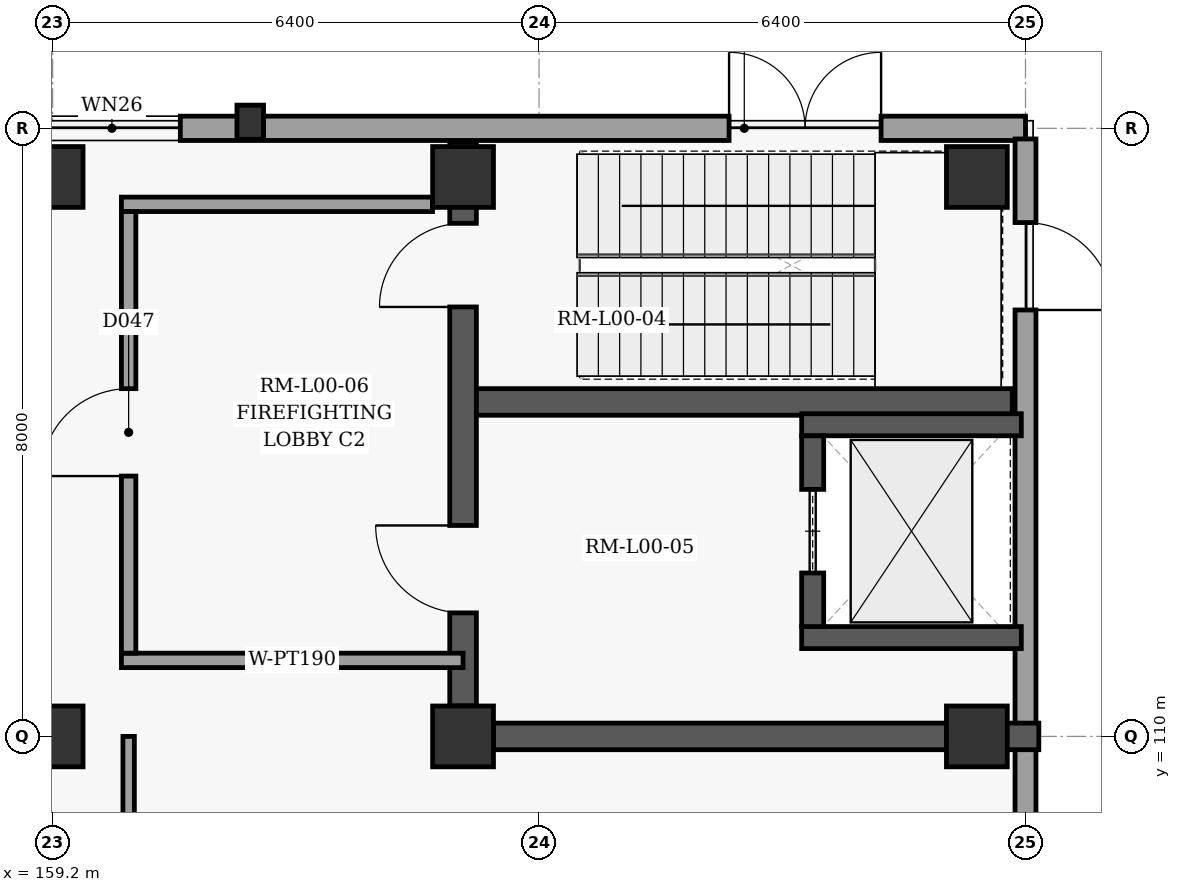
"""IFC4 building model, lengths in metres.
Left out: names, types, materials, properties, quantities, classifications, styles, units other than length and angle.
Written with IfcOpenShell. Run it as: python <this file> out.ifc"""

import sys

from ifc_helpers import new_model, si_unit, direction, frame, frame_2d, origin, origin_2d, place, context, subcontext, project, spatial, rectangle, extrude, element, fill, save


model = new_model("IFC4")
c1 = context("Model", 3, precision=1e-05, world=origin(), true_north=direction((0.0, 1.0)))
c2 = subcontext(c1, "Body", "Model", "MODEL_VIEW")
j1 = project(units=[si_unit("LENGTHUNIT", "METRE"), si_unit("PLANEANGLEUNIT", "RADIAN")], contexts=[c1])
p1 = place(None, origin())
s1 = spatial("IfcSite", under=j1, at=p1, CompositionType="ELEMENT")
p2 = place(p1, origin())
s2 = spatial("IfcBuilding", under=s1, at=p2, CompositionType="ELEMENT")
p3 = place(p2, origin())
s3 = spatial("IfcBuildingStorey", under=s2, at=p3, CompositionType="ELEMENT", Elevation=0.0)
for number, where, z_axis, x_axis in (
    (1, (159.2, 110.0, 0.0), (0.0, 0.0, 1.0), (1.0, 0.0, 0.0)),
    (2, (159.2, 117.36, 0.0), (0.0, 0.0, 1.0), (1.0, 0.0, 0.0)),
    (3, (164.6, 110.0, 0.0), (0.0, 0.0, 1.0), (1.0, 0.0, 0.0)),
    (4, (164.6, 117.36, 0.0), (0.0, 0.0, 1.0), (1.0, 0.0, 0.0)),
    (5, (171.36, 110.0, 0.0), (0.0, 0.0, 1.0), (1.0, 0.0, 0.0)),
    (6, (171.36, 117.36, 0.0), (0.0, 0.0, 1.0), (1.0, 0.0, 0.0)),
):
    element("IfcColumn", number, at=place(p3, frame(where, z_axis=z_axis, x_axis=x_axis)), inside=s3, PredefinedType="COLUMN", context=c2, shape_type="SweptSolid", body=[
        extrude(rectangle(XDim=0.8, YDim=0.8, at=origin_2d()), origin(), (0.0, 0.0, 1.0), 5.4),
    ])
p4 = place(p3, frame((161.8, 118.08, 0.0), z_axis=(0.0, 0.0, 1.0), x_axis=(0.0, 1.0, 0.0)))
e7 = element("IfcColumn", 7, at=p4, inside=s3, PredefinedType="PILASTER", context=c2, shape_type="SweptSolid", body=[
    extrude(rectangle(XDim=0.35, YDim=0.45, at=origin_2d()), origin(), (0.0, 0.0, 1.0), 5.4),
])
p5 = place(p3, frame((139.6, 118.0, 0.0), z_axis=(0.0, 0.0, 1.0), x_axis=(1.0, 0.0, 0.0)))
e8 = element("IfcWall", 8, at=p5, inside=s3, PredefinedType="SOLIDWALL", context=c2, shape_type="SweptSolid", body=[
    extrude(rectangle(XDim=32.4, YDim=0.32, at=frame_2d((16.2, 0.0))), origin(), (0.0, 0.0, 1.0), 5.14),
])
p6 = place(p5, frame((28.5, 0.0, 0.0)))
e9 = element("IfcOpeningElement", 9, at=p6, cuts=e8, PredefinedType="OPENING", context=c2, shape_type="SweptSolid", body=[
    extrude(rectangle(XDim=2.0, YDim=2.5, at=frame_2d((1.0, 1.25))), frame((0.0, 0.17, 0.0), z_axis=(0.0, -1.0, 0.0), x_axis=(1.0, 0.0, 0.0)), (0.0, 0.0, 1.0), 0.34),
])
p7 = place(p5, frame((2.2, 0.0, 0.9)))
e10 = element("IfcOpeningElement", 10, at=p7, cuts=e8, PredefinedType="OPENING", context=c2, shape_type="SweptSolid", body=[
    extrude(rectangle(XDim=3.6, YDim=2.6, at=frame_2d((1.8, 1.3))), frame((0.0, 0.17, 0.0), z_axis=(0.0, -1.0, 0.0), x_axis=(1.0, 0.0, 0.0)), (0.0, 0.0, 1.0), 0.34),
])
p8 = place(p5, frame((7.96, 0.0, 0.9)))
e11 = element("IfcOpeningElement", 11, at=p8, cuts=e8, PredefinedType="OPENING", context=c2, shape_type="SweptSolid", body=[
    extrude(rectangle(XDim=3.8, YDim=2.6, at=frame_2d((1.9, 1.3))), frame((0.0, 0.17, 0.0), z_axis=(0.0, -1.0, 0.0), x_axis=(1.0, 0.0, 0.0)), (0.0, 0.0, 1.0), 0.34),
])
p9 = place(p5, frame((13.72, 0.0, 0.9)))
e12 = element("IfcOpeningElement", 12, at=p9, cuts=e8, PredefinedType="OPENING", context=c2, shape_type="SweptSolid", body=[
    extrude(rectangle(XDim=1.6, YDim=1.65, at=frame_2d((0.8, 0.825))), frame((0.0, 0.17, 0.0), z_axis=(0.0, -1.0, 0.0), x_axis=(1.0, 0.0, 0.0)), (0.0, 0.0, 1.0), 0.34),
])
p10 = place(p5, frame((19.48, 0.0, 0.9)))
e13 = element("IfcOpeningElement", 13, at=p10, cuts=e8, PredefinedType="OPENING", context=c2, shape_type="SweptSolid", body=[
    extrude(rectangle(XDim=1.8, YDim=1.65, at=frame_2d((0.9, 0.825))), frame((0.0, 0.17, 0.0), z_axis=(0.0, -1.0, 0.0), x_axis=(1.0, 0.0, 0.0)), (0.0, 0.0, 1.0), 0.34),
])
p11 = place(p3, frame((172.0, 117.86, 0.0), z_axis=(0.0, 0.0, 1.0), x_axis=(0.0, -1.0, 0.0)))
e14 = element("IfcWall", 14, at=p11, inside=s3, PredefinedType="SOLIDWALL", context=c2, shape_type="SweptSolid", body=[
    extrude(rectangle(XDim=46.12, YDim=0.275, at=frame_2d((23.06, 0.0))), origin(), (0.0, 0.0, 1.0), 5.14),
])
p12 = place(p11, frame((43.87, 0.0, 0.0)))
e15 = element("IfcOpeningElement", 15, at=p12, cuts=e14, PredefinedType="OPENING", context=c2, shape_type="SweptSolid", body=[
    extrude(rectangle(XDim=1.15, YDim=2.2, at=frame_2d((0.575, 1.1))), frame((0.0, 0.147, 0.0), z_axis=(0.0, -1.0, 0.0), x_axis=(1.0, 0.0, 0.0)), (0.0, 0.0, 1.0), 0.295),
])
p13 = place(p11, frame((1.1, 0.0, 0.0)))
e16 = element("IfcOpeningElement", 16, at=p13, cuts=e14, PredefinedType="OPENING", context=c2, shape_type="SweptSolid", body=[
    extrude(rectangle(XDim=1.15, YDim=2.2, at=frame_2d((0.575, 1.1))), frame((0.0, 0.147, 0.0), z_axis=(0.0, -1.0, 0.0), x_axis=(1.0, 0.0, 0.0)), (0.0, 0.0, 1.0), 0.295),
])
p14 = place(p3, frame((165.002, 110.0, 0.0), z_axis=(0.0, 0.0, 1.0), x_axis=(1.0, 0.0, 0.0)))
e17 = element("IfcWall", 17, at=p14, inside=s3, PredefinedType="SHEAR", context=c2, shape_type="SweptSolid", body=[
    extrude(rectangle(XDim=7.173, YDim=0.35, at=frame_2d((3.586, 0.0))), origin(), (0.0, 0.0, 1.0), 5.14),
])
p15 = place(p3, frame((164.6, 110.402, 0.0), z_axis=(0.0, 0.0, 1.0), x_axis=(0.0, 1.0, 0.0)))
e18 = element("IfcWall", 18, at=p15, inside=s3, PredefinedType="SHEAR", context=c2, shape_type="SweptSolid", body=[
    extrude(rectangle(XDim=7.423, YDim=0.35, at=frame_2d((3.711, 0.0))), origin(), (0.0, 0.0, 1.0), 5.14),
])
p16 = place(p15, frame((5.248, 0.0, 0.0)))
e19 = element("IfcOpeningElement", 19, at=p16, cuts=e18, PredefinedType="OPENING", context=c2, shape_type="SweptSolid", body=[
    extrude(rectangle(XDim=1.1, YDim=2.15, at=frame_2d((0.55, 1.075))), frame((0.0, 0.185, 0.0), z_axis=(0.0, -1.0, 0.0), x_axis=(1.0, 0.0, 0.0)), (0.0, 0.0, 1.0), 0.37),
])
p17 = place(p15, frame((1.223, 0.0, 0.0)))
e20 = element("IfcOpeningElement", 20, at=p17, cuts=e18, PredefinedType="OPENING", context=c2, shape_type="SweptSolid", body=[
    extrude(rectangle(XDim=1.15, YDim=2.2, at=frame_2d((0.575, 1.1))), frame((0.0, 0.185, 0.0), z_axis=(0.0, -1.0, 0.0), x_axis=(1.0, 0.0, 0.0)), (0.0, 0.0, 1.0), 0.37),
])
p18 = place(p3, frame((164.775, 114.4, 0.0), z_axis=(0.0, 0.0, 1.0), x_axis=(1.0, 0.0, 0.0)))
e21 = element("IfcWall", 21, at=p18, inside=s3, PredefinedType="SHEAR", context=c2, shape_type="SweptSolid", body=[
    extrude(rectangle(XDim=7.05, YDim=0.35, at=frame_2d((3.525, 0.0))), origin(), (0.0, 0.0, 1.0), 5.14),
])
for number, where, z_axis, x_axis in (
    (22, (169.055, 111.3, 0.0), (0.0, 0.0, 1.0), (1.0, 0.0, 0.0)),
    (23, (169.055, 114.1, 0.0), (0.0, 0.0, 1.0), (1.0, 0.0, 0.0)),
):
    element("IfcWall", number, at=place(p3, frame(where, z_axis=z_axis, x_axis=x_axis)), inside=s3, PredefinedType="SHEAR", context=c2, shape_type="SweptSolid", body=[
        extrude(rectangle(XDim=2.89, YDim=0.29, at=frame_2d((1.445, 0.0))), origin(), (0.0, 0.0, 1.0), 5.14),
    ])
p19 = place(p3, frame((169.2, 111.445, 0.0), z_axis=(0.0, 0.0, 1.0), x_axis=(0.0, 1.0, 0.0)))
e24 = element("IfcWall", 24, at=p19, inside=s3, PredefinedType="SHEAR", context=c2, shape_type="SweptSolid", body=[
    extrude(rectangle(XDim=2.51, YDim=0.29, at=frame_2d((1.255, 0.0))), origin(), (0.0, 0.0, 1.0), 5.14),
])
p20 = place(p19, frame((0.705, 0.0, 0.0)))
e25 = element("IfcOpeningElement", 25, at=p20, cuts=e24, PredefinedType="OPENING", context=c2, shape_type="SweptSolid", body=[
    extrude(rectangle(XDim=1.1, YDim=2.15, at=frame_2d((0.55, 1.075))), frame((0.0, 0.155, 0.0), z_axis=(0.0, -1.0, 0.0), x_axis=(1.0, 0.0, 0.0)), (0.0, 0.0, 1.0), 0.31),
])
p21 = place(p3, frame((160.105, 111.0, 0.0), z_axis=(0.0, 0.0, 1.0), x_axis=(1.0, 0.0, 0.0)))
e26 = element("IfcWall", 26, at=p21, inside=s3, PredefinedType="PARTITIONING", context=c2, shape_type="SweptSolid", body=[
    extrude(rectangle(XDim=4.495, YDim=0.19, at=frame_2d((2.248, 0.0))), origin(), (0.0, 0.0, 1.0), 5.14),
])
p22 = place(p3, frame((160.105, 117.0, 0.0), z_axis=(0.0, 0.0, 1.0), x_axis=(1.0, 0.0, 0.0)))
e27 = element("IfcWall", 27, at=p22, inside=s3, PredefinedType="PARTITIONING", context=c2, shape_type="SweptSolid", body=[
    extrude(rectangle(XDim=4.093, YDim=0.19, at=frame_2d((2.046, 0.0))), origin(), (0.0, 0.0, 1.0), 4.49),
])
p23 = place(p3, frame((160.2, 111.095, 0.0), z_axis=(0.0, 0.0, 1.0), x_axis=(0.0, 1.0, 0.0)))
e28 = element("IfcWall", 28, at=p23, inside=s3, PredefinedType="PARTITIONING", context=c2, shape_type="SweptSolid", body=[
    extrude(rectangle(XDim=5.81, YDim=0.19, at=frame_2d((2.905, 0.0))), origin(), (0.0, 0.0, 1.0), 5.14),
])
p24 = place(p23, frame((2.33, 0.0, 0.0)))
e29 = element("IfcOpeningElement", 29, at=p24, cuts=e28, PredefinedType="OPENING", context=c2, shape_type="SweptSolid", body=[
    extrude(rectangle(XDim=1.15, YDim=2.2, at=frame_2d((0.575, 1.1))), frame((0.0, 0.105, 0.0), z_axis=(0.0, -1.0, 0.0), x_axis=(1.0, 0.0, 0.0)), (0.0, 0.0, 1.0), 0.21),
])
p25 = place(p3, frame((160.2, 110.0, 0.0), z_axis=(0.0, 0.0, 1.0), x_axis=(0.0, -1.0, 0.0)))
e30 = element("IfcWall", 30, at=p25, inside=s3, PredefinedType="PARTITIONING", context=c2, shape_type="SweptSolid", body=[
    extrude(rectangle(XDim=8.0, YDim=0.15, at=frame_2d((4.0, 0.0))), origin(), (0.0, 0.0, 1.0), 5.14),
])
p26 = place(p13, origin())
e31 = element("IfcDoor", 31, at=p26, inside=s3, OperationType="SINGLE_SWING_RIGHT", PredefinedType="DOOR", context=c2, shape_type="SweptSolid", body=[
    extrude(rectangle(XDim=1.15, YDim=2.2, at=frame_2d((0.575, 1.1))), frame((0.0, 0.025, 0.0), z_axis=(0.0, -1.0, 0.0), x_axis=(1.0, 0.0, 0.0)), (0.0, 0.0, 1.0), 0.05),
])
fill(e16, e31)
p27 = place(p6, origin())
e32 = element("IfcDoor", 32, at=p27, inside=s3, OperationType="DOUBLE_SWING_LEFT", PredefinedType="DOOR", context=c2, shape_type="SweptSolid", body=[
    extrude(rectangle(XDim=2.0, YDim=2.5, at=frame_2d((1.0, 1.25))), frame((0.0, 0.025, 0.0), z_axis=(0.0, -1.0, 0.0), x_axis=(1.0, 0.0, 0.0)), (0.0, 0.0, 1.0), 0.05),
])
fill(e9, e32)
p28 = place(p10, origin())
e33 = element("IfcWindow", 33, at=p28, inside=s3, PartitioningType="SINGLE_PANEL", PredefinedType="WINDOW", context=c2, shape_type="SweptSolid", body=[
    extrude(rectangle(XDim=1.8, YDim=1.65, at=frame_2d((0.9, 0.825))), frame((0.0, 0.03, 0.0), z_axis=(0.0, -1.0, 0.0), x_axis=(1.0, 0.0, 0.0)), (0.0, 0.0, 1.0), 0.06),
])
fill(e13, e33)
p29 = place(p16, origin())
e34 = element("IfcDoor", 34, at=p29, inside=s3, OperationType="SINGLE_SWING_LEFT", PredefinedType="DOOR", context=c2, shape_type="SweptSolid", body=[
    extrude(rectangle(XDim=1.1, YDim=2.15, at=frame_2d((0.55, 1.075))), frame((0.0, 0.025, 0.0), z_axis=(0.0, -1.0, 0.0), x_axis=(1.0, 0.0, 0.0)), (0.0, 0.0, 1.0), 0.05),
])
fill(e19, e34)
p30 = place(p17, origin())
e35 = element("IfcDoor", 35, at=p30, inside=s3, OperationType="SINGLE_SWING_RIGHT", PredefinedType="DOOR", context=c2, shape_type="SweptSolid", body=[
    extrude(rectangle(XDim=1.15, YDim=2.2, at=frame_2d((0.575, 1.1))), frame((0.0, 0.025, 0.0), z_axis=(0.0, -1.0, 0.0), x_axis=(1.0, 0.0, 0.0)), (0.0, 0.0, 1.0), 0.05),
])
fill(e20, e35)
p31 = place(p20, origin())
e36 = element("IfcDoor", 36, at=p31, inside=s3, OperationType="SLIDING_TO_LEFT", PredefinedType="DOOR", context=c2, shape_type="SweptSolid", body=[
    extrude(rectangle(XDim=1.1, YDim=2.15, at=frame_2d((0.55, 1.075))), frame((0.0, 0.025, 0.0), z_axis=(0.0, -1.0, 0.0), x_axis=(1.0, 0.0, 0.0)), (0.0, 0.0, 1.0), 0.05),
])
fill(e25, e36)
p32 = place(p24, origin())
e37 = element("IfcDoor", 37, at=p32, inside=s3, OperationType="SINGLE_SWING_LEFT", PredefinedType="DOOR", context=c2, shape_type="SweptSolid", body=[
    extrude(rectangle(XDim=1.15, YDim=2.2, at=frame_2d((0.575, 1.1))), frame((0.0, 0.025, 0.0), z_axis=(0.0, -1.0, 0.0), x_axis=(1.0, 0.0, 0.0)), (0.0, 0.0, 1.0), 0.05),
])
fill(e29, e37)
save(model, sys.argv[1])
